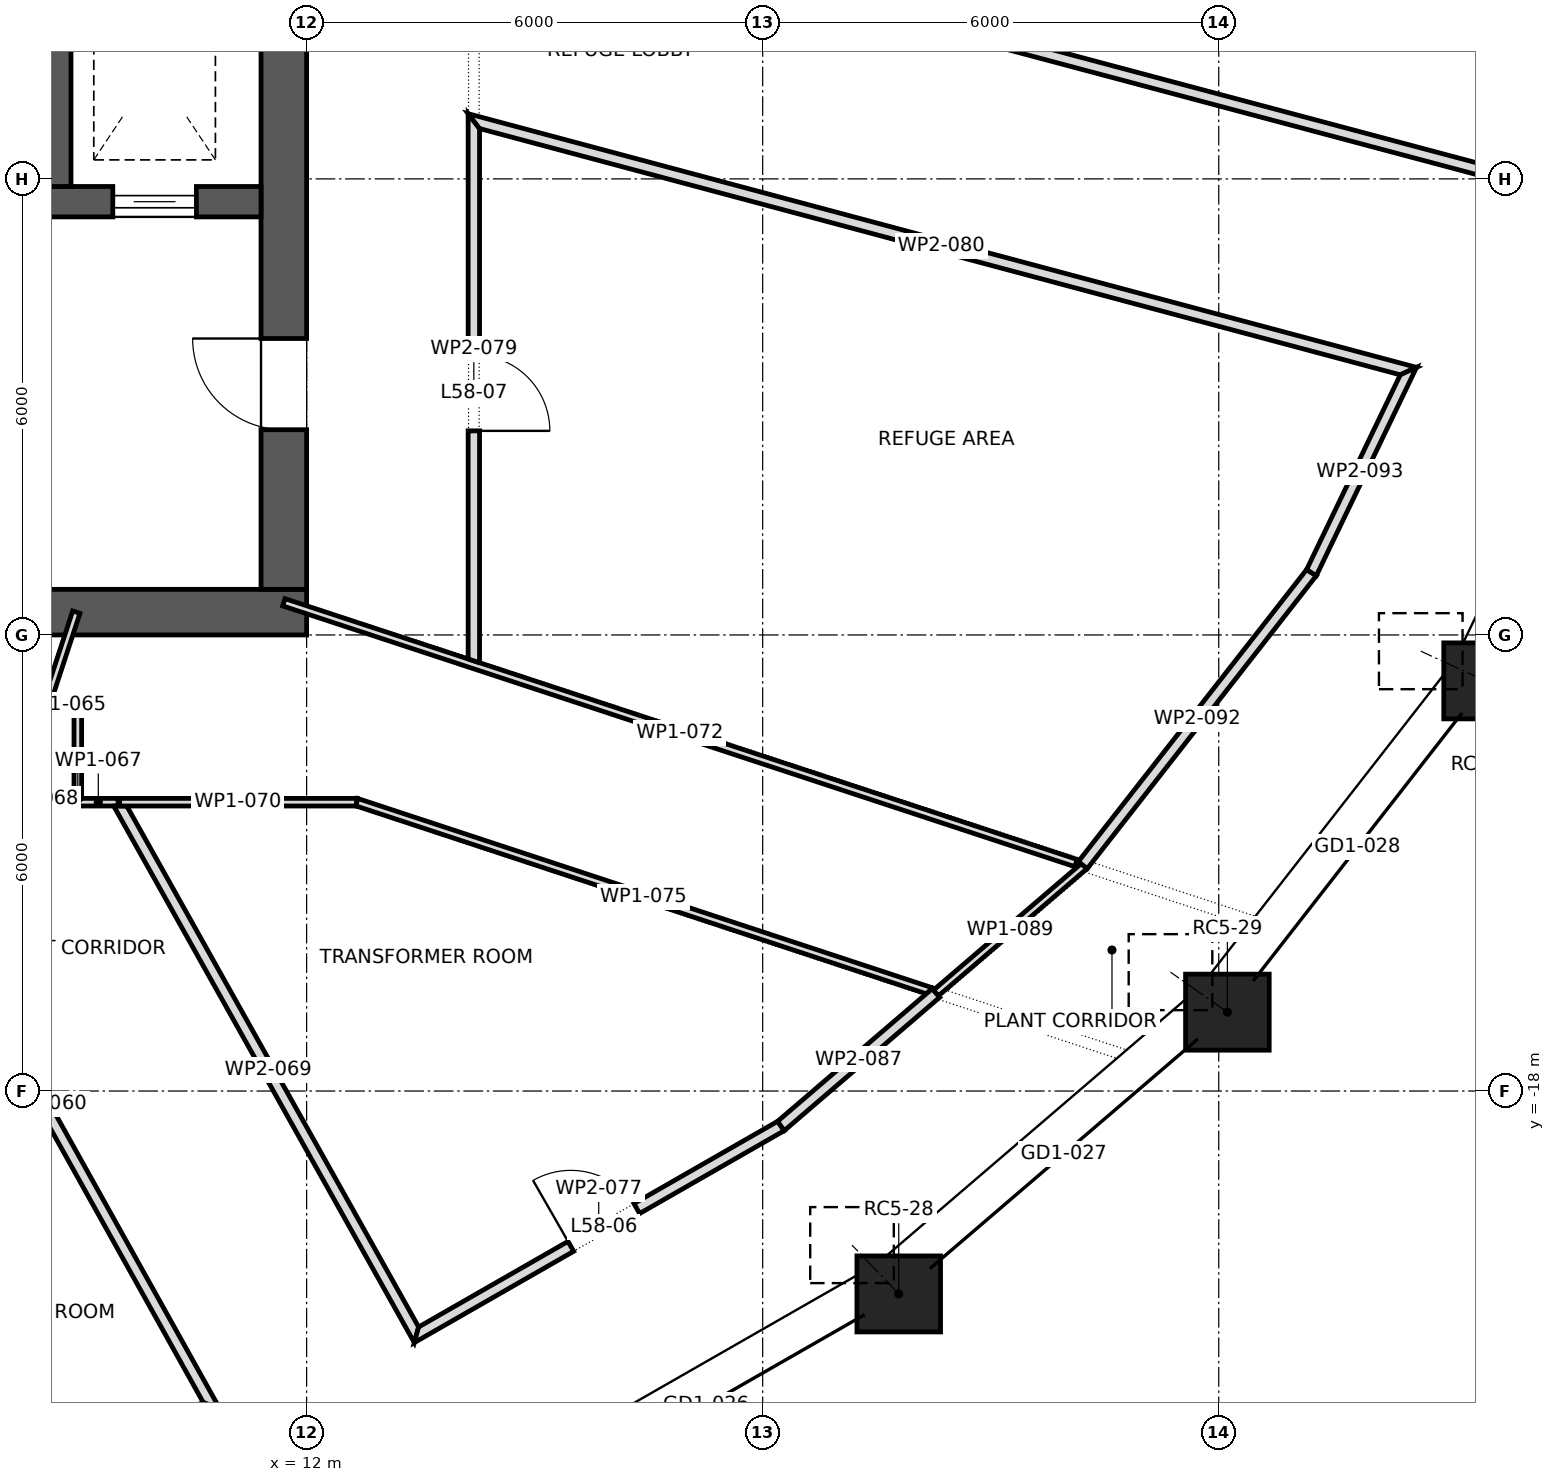
"""IFC4 building model, lengths in metres.
Left out: names, types, materials, properties, quantities, classifications, styles, units other than length and angle.
Written with IfcOpenShell. Run it as: python <this file> out.ifc"""

import sys

from ifc_helpers import new_model, si_unit, direction, frame, frame_2d, origin, origin_2d, place, context, subcontext, project, spatial, polyline, rectangle, outline, extrude, element, fill, save


model = new_model("IFC4")
c1 = context("Model", 3, precision=1e-05, world=origin(), true_north=direction((0.0, 1.0)))
c2 = subcontext(c1, "Body", "Model", "MODEL_VIEW")
j1 = project(units=[si_unit("LENGTHUNIT", "METRE"), si_unit("PLANEANGLEUNIT", "RADIAN")], contexts=[c1])
p1 = place(None, origin())
s1 = spatial("IfcSite", under=j1, at=p1, CompositionType="ELEMENT")
p2 = place(p1, origin())
s2 = spatial("IfcBuilding", under=s1, at=p2, CompositionType="ELEMENT")
p3 = place(p2, frame((0.0, 0.0, 250.9)))
s3 = spatial("IfcBuildingStorey", under=s2, at=p3, CompositionType="ELEMENT", Elevation=250.9)
p4 = place(p3, frame((19.79, -20.669, 0.083), z_axis=(-0.115812481815, 0.12096379157, 0.985877898213), x_axis=(-0.722319686129, -0.691559304059, 0.0)))
e1 = element("IfcColumn", 1, at=p4, inside=s3, PredefinedType="COLUMN", context=c2, shape_type="SweptSolid", body=[
    extrude(rectangle(XDim=1.1, YDim=1.0, at=origin_2d()), origin(), (0.0, 0.0, 1.0), 5.308),
])
p5 = place(p3, frame((24.114, -16.962, 0.086), z_axis=(-0.14102688006, 0.099169586892, 0.985026300226), x_axis=(-0.575215805529, -0.818001697473, 0.0)))
e2 = element("IfcColumn", 2, at=p5, inside=s3, PredefinedType="COLUMN", context=c2, shape_type="SweptSolid", body=[
    extrude(rectangle(XDim=1.1, YDim=1.0, at=origin_2d()), origin(), (0.0, 0.0, 1.0), 5.308),
])
p6 = place(p3, frame((27.511, -12.604, 0.088), z_axis=(-0.160721780276, 0.073644982891, 0.984248406572), x_axis=(-0.416565116305, -0.909105881555, 0.0)))
e3 = element("IfcColumn", 3, at=p6, inside=s3, PredefinedType="COLUMN", context=c2, shape_type="SweptSolid", body=[
    extrude(rectangle(XDim=1.1, YDim=1.0, at=origin_2d()), origin(), (0.0, 0.0, 1.0), 5.307),
])
p7 = place(p3, frame((-12.0, -11.7, 0.0), z_axis=(0.0, 0.0, 1.0), x_axis=(1.0, 0.0, 0.0)))
e4 = element("IfcWall", 4, at=p7, inside=s3, PredefinedType="SHEAR", context=c2, shape_type="SweptSolid", body=[
    extrude(rectangle(XDim=24.0, YDim=0.6, at=frame_2d((12.0, 0.0))), origin(), (0.0, 0.0, 1.0), 5.4),
])
p8 = place(p7, frame((10.025, 0.0, 0.0)))
e5 = element("IfcOpeningElement", 5, at=p8, cuts=e4, PredefinedType="OPENING", context=c2, shape_type="SweptSolid", body=[
    extrude(rectangle(XDim=0.8, YDim=2.1, at=frame_2d((0.4, 1.05))), frame((0.0, 0.312, 0.0), z_axis=(0.0, -1.0, 0.0), x_axis=(1.0, 0.0, 0.0)), (0.0, 0.0, 1.0), 0.624),
])
p9 = place(p7, frame((4.2, 0.0, 0.0)))
e6 = element("IfcOpeningElement", 6, at=p9, cuts=e4, PredefinedType="OPENING", context=c2, shape_type="SweptSolid", body=[
    extrude(rectangle(XDim=0.8, YDim=2.1, at=frame_2d((0.4, 1.05))), frame((0.0, 0.312, 0.0), z_axis=(0.0, -1.0, 0.0), x_axis=(1.0, 0.0, 0.0)), (0.0, 0.0, 1.0), 0.624),
])
p10 = place(p7, frame((15.85, 0.0, 0.0)))
e7 = element("IfcOpeningElement", 7, at=p10, cuts=e4, PredefinedType="OPENING", context=c2, shape_type="SweptSolid", body=[
    extrude(rectangle(XDim=0.8, YDim=2.1, at=frame_2d((0.4, 1.05))), frame((0.0, 0.312, 0.0), z_axis=(0.0, -1.0, 0.0), x_axis=(1.0, 0.0, 0.0)), (0.0, 0.0, 1.0), 0.624),
])
p11 = place(p3, frame((11.7, -11.4, 0.0), z_axis=(0.0, 0.0, 1.0), x_axis=(0.0, 1.0, 0.0)))
e8 = element("IfcWall", 8, at=p11, inside=s3, PredefinedType="SHEAR", context=c2, shape_type="SweptSolid", body=[
    extrude(rectangle(XDim=22.8, YDim=0.6, at=frame_2d((11.4, 0.0))), origin(), (0.0, 0.0, 1.0), 5.4),
])
p12 = place(p11, frame((10.2, 0.0, 0.0)))
e9 = element("IfcOpeningElement", 9, at=p12, cuts=e8, PredefinedType="OPENING", context=c2, shape_type="SweptSolid", body=[
    extrude(rectangle(XDim=2.4, YDim=2.1, at=frame_2d((1.2, 1.05))), frame((0.0, 0.312, 0.0), z_axis=(0.0, -1.0, 0.0), x_axis=(1.0, 0.0, 0.0)), (0.0, 0.0, 1.0), 0.624),
])
p13 = place(p11, frame((19.5, 0.0, 0.0)))
e10 = element("IfcOpeningElement", 10, at=p13, cuts=e8, PredefinedType="OPENING", context=c2, shape_type="SweptSolid", body=[
    extrude(rectangle(XDim=1.2, YDim=2.1, at=frame_2d((0.6, 1.05))), frame((0.0, 0.312, 0.0), z_axis=(0.0, -1.0, 0.0), x_axis=(1.0, 0.0, 0.0)), (0.0, 0.0, 1.0), 0.624),
])
p14 = place(p11, frame((2.1, 0.0, 0.0)))
e11 = element("IfcOpeningElement", 11, at=p14, cuts=e8, PredefinedType="OPENING", context=c2, shape_type="SweptSolid", body=[
    extrude(rectangle(XDim=1.2, YDim=2.1, at=frame_2d((0.6, 1.05))), frame((0.0, 0.312, 0.0), z_axis=(0.0, -1.0, 0.0), x_axis=(1.0, 0.0, 0.0)), (0.0, 0.0, 1.0), 0.624),
])
p15 = place(p3, frame((-11.4, -6.3, 0.0), z_axis=(0.0, 0.0, 1.0), x_axis=(1.0, 0.0, 0.0)))
e12 = element("IfcWall", 12, at=p15, inside=s3, PredefinedType="SHEAR", context=c2, shape_type="SweptSolid", body=[
    extrude(rectangle(XDim=22.8, YDim=0.4, at=frame_2d((11.4, 0.0))), origin(), (0.0, 0.0, 1.0), 5.4),
])
p16 = place(p15, frame((20.85, 0.0, 0.0)))
e13 = element("IfcOpeningElement", 13, at=p16, cuts=e12, PredefinedType="OPENING", context=c2, shape_type="SweptSolid", body=[
    extrude(rectangle(XDim=1.1, YDim=2.1, at=frame_2d((0.55, 1.05))), frame((0.0, 0.212, 0.0), z_axis=(0.0, -1.0, 0.0), x_axis=(1.0, 0.0, 0.0)), (0.0, 0.0, 1.0), 0.424),
])
p17 = place(p3, frame((8.75, -6.1, 0.0), z_axis=(0.0, 0.0, 1.0), x_axis=(0.0, 1.0, 0.0)))
e14 = element("IfcWall", 14, at=p17, inside=s3, PredefinedType="SHEAR", context=c2, shape_type="SweptSolid", body=[
    extrude(rectangle(XDim=2.9, YDim=0.3, at=frame_2d((1.45, 0.0))), origin(), (0.0, 0.0, 1.0), 5.4),
])
p18 = place(p3, frame((6.299, -14.162, 0.0), z_axis=(0.0, 0.0, 1.0), x_axis=(0.487226307056, -0.873275744374, 0.0)))
e15 = element("IfcWall", 15, at=p18, inside=s3, PredefinedType="PARTITIONING", context=c2, shape_type="SweptSolid", body=[
    extrude(outline(polyline([(0.088, -0.075), (1.88, -0.075), (3.672, -0.075), (5.464, -0.075), (7.255, -0.075), (9.047, -0.075), (9.225, 0.075), (9.225, 0.075), (7.38, 0.075), (5.535, 0.075), (3.69, 0.075), (1.845, 0.075), (0.0, 0.075), (0.0, 0.075), (0.088, -0.075)])), origin(), (0.0, 0.0, 1.0), 5.1),
])
p19 = place(p3, frame((8.374, -22.982, 0.0), z_axis=(0.0, 0.0, 1.0), x_axis=(0.942556062192, 0.334048004971, 0.0)))
e16 = element("IfcWall", 16, at=p19, inside=s3, PredefinedType="PARTITIONING", context=c2, shape_type="SweptSolid", body=[
    extrude(outline(polyline([(0.0, -0.075), (1.305, -0.075), (2.61, -0.075), (2.432, 0.075), (0.013, 0.075), (0.0, -0.075)])), origin(), (0.0, 0.0, 1.0), 5.1),
])
p20 = place(p3, frame((8.542, -12.844, 0.0), z_axis=(0.0, 0.0, 1.0), x_axis=(0.951016373971, -0.30914051245, 0.0)))
e17 = element("IfcWall", 17, at=p20, inside=s3, PredefinedType="PARTITIONING", context=c2, shape_type="SweptSolid", body=[
    extrude(outline(polyline([(0.0, -0.05), (0.434, -0.05), (0.507, 0.05), (0.507, 0.05), (0.1, 0.05), (0.0, -0.05)])), origin(), (0.0, 0.0, 1.0), 5.1),
])
p21 = place(p3, frame((8.97, -11.7, 0.0), z_axis=(0.0, 0.0, 1.0), x_axis=(-0.311209419885, -0.950341358131, 0.0)))
e18 = element("IfcWall", 18, at=p21, inside=s3, PredefinedType="PARTITIONING", context=c2, shape_type="SweptSolid", body=[
    extrude(outline(polyline([(1.271, -0.05), (1.271, -0.05), (1.17, 0.05), (0.0, 0.05), (0.0, -0.05), (1.271, -0.05)])), origin(), (0.0, 0.0, 1.0), 5.1),
])
p22 = place(p3, frame((8.94, -14.2, 0.0), z_axis=(0.0, 0.0, 1.0), x_axis=(1.0, 0.0, 0.0)))
e19 = element("IfcWall", 19, at=p22, inside=s3, PredefinedType="PARTITIONING", context=c2, shape_type="SweptSolid", body=[
    extrude(outline(polyline([(0.0, -0.05), (0.59, -0.05), (0.59, 0.05), (0.59, 0.05), (0.59, 0.05), (0.1, 0.05), (0.0, -0.05)])), origin(), (0.0, 0.0, 1.0), 5.1),
])
p23 = place(p3, frame((8.99, -12.954, 0.0), z_axis=(0.0, 0.0, 1.0), x_axis=(0.0, -1.0, 0.0)))
e20 = element("IfcWall", 20, at=p23, inside=s3, PredefinedType="PARTITIONING", context=c2, shape_type="SweptSolid", body=[
    extrude(outline(polyline([(1.296, -0.05), (1.296, -0.05), (1.196, 0.05), (0.0, 0.05), (0.073, -0.05), (1.296, -0.05)])), origin(), (0.0, 0.0, 1.0), 5.1),
])
p24 = place(p3, frame((9.528, -14.213, 0.0), z_axis=(0.0, 0.0, 1.0), x_axis=(0.488729226687, -0.872435523682, 0.0)))
e21 = element("IfcWall", 21, at=p24, inside=s3, PredefinedType="PARTITIONING", context=c2, shape_type="SweptSolid", body=[
    extrude(outline(polyline([(0.0, -0.075), (1.618, -0.075), (3.237, -0.075), (4.855, -0.075), (6.473, -0.075), (8.092, -0.075), (8.028, -0.012), (7.94, 0.075), (5.976, 0.075), (4.012, 0.075), (2.048, 0.075), (0.084, 0.075), (0.033, -0.016), (0.0, -0.075), (0.0, -0.075)])), origin(), (0.0, 0.0, 1.0), 5.1),
])
p25 = place(p3, frame((9.53, -14.2, 0.0), z_axis=(0.0, 0.0, 1.0), x_axis=(1.0, 0.0, 0.0)))
e22 = element("IfcWall", 22, at=p25, inside=s3, PredefinedType="PARTITIONING", context=c2, shape_type="SweptSolid", body=[
    extrude(outline(polyline([(0.0, -0.05), (1.561, -0.05), (3.122, -0.05), (3.138, 0.05), (3.138, 0.05), (1.569, 0.05), (0.0, 0.05), (0.0, -0.05)])), origin(), (0.0, 0.0, 1.0), 5.1),
])
p26 = place(p3, frame((11.7, -11.57, 0.0), z_axis=(0.0, 0.0, 1.0), x_axis=(0.949849374499, -0.312707796135, 0.0)))
e23 = element("IfcWall", 23, at=p26, inside=s3, PredefinedType="PARTITIONING", context=c2, shape_type="SweptSolid", body=[
    extrude(rectangle(XDim=10.972, YDim=0.1, at=frame_2d((5.486, 0.0))), origin(), (0.0, 0.0, 1.0), 5.1),
])
p27 = place(p3, frame((12.652, -14.198, 0.0), z_axis=(0.0, 0.0, 1.0), x_axis=(0.949797020895, -0.31286677532, 0.0)))
e24 = element("IfcWall", 24, at=p27, inside=s3, PredefinedType="PARTITIONING", context=c2, shape_type="SweptSolid", body=[
    extrude(outline(polyline([(0.016, -0.05), (1.99, -0.05), (3.965, -0.05), (5.939, -0.05), (7.913, -0.05), (7.967, 0.039), (8.002, 0.017), (8.002, 0.017), (7.988, 0.026), (8.002, 0.05), (8.002, 0.05), (6.402, 0.05), (4.802, 0.05), (3.201, 0.05), (1.601, 0.05), (0.0, 0.05), (0.008, 0.0), (0.016, -0.05), (0.016, -0.05), (0.016, -0.05)])), origin(), (0.0, 0.0, 1.0), 5.1),
])
p28 = place(p3, frame((13.379, -21.245, 0.0), z_axis=(0.0, 0.0, 1.0), x_axis=(0.867677390778, 0.497127695399, 0.0)))
e25 = element("IfcWall", 25, at=p28, inside=s3, PredefinedType="PARTITIONING", context=c2, shape_type="SweptSolid", body=[
    extrude(outline(polyline([(5.609, -0.075), (5.609, -0.074), (5.595, 0.075), (3.78, 0.075), (1.966, 0.075), (0.152, 0.075), (0.0, -0.075), (1.87, -0.075), (3.739, -0.075), (5.609, -0.075)])), origin(), (0.0, 0.0, 1.0), 5.1),
])
p29 = place(p28, frame((2.417, 0.0, 0.0)))
e26 = element("IfcOpeningElement", 26, at=p29, cuts=e25, PredefinedType="OPENING", context=c2, shape_type="SweptSolid", body=[
    extrude(rectangle(XDim=1.0, YDim=2.1, at=frame_2d((0.5, 1.05))), frame((0.0, 0.087, 0.0), z_axis=(0.0, -1.0, 0.0), x_axis=(1.0, 0.0, 0.0)), (0.0, 0.0, 1.0), 0.174),
])
p30 = place(p3, frame((14.2, -5.142, 0.0), z_axis=(0.0, 0.0, 1.0), x_axis=(0.0, -1.0, 0.0)))
e27 = element("IfcWall", 27, at=p30, inside=s3, PredefinedType="PARTITIONING", context=c2, shape_type="SweptSolid", body=[
    extrude(outline(polyline([(0.0, -0.075), (1.793, -0.075), (3.587, -0.075), (5.38, -0.075), (7.173, -0.075), (7.223, 0.075), (7.223, 0.075), (5.466, 0.075), (3.709, 0.075), (1.952, 0.075), (0.195, 0.075), (0.098, 0.0), (0.0, -0.075), (0.0, -0.075)])), origin(), (0.0, 0.0, 1.0), 5.1),
])
p31 = place(p30, frame((3.173, 0.0, 0.0)))
e28 = element("IfcOpeningElement", 28, at=p31, cuts=e27, PredefinedType="OPENING", context=c2, shape_type="SweptSolid", body=[
    extrude(rectangle(XDim=1.0, YDim=2.1, at=frame_2d((0.5, 1.05))), frame((0.0, 0.087, 0.0), z_axis=(0.0, -1.0, 0.0), x_axis=(1.0, 0.0, 0.0)), (0.0, 0.0, 1.0), 0.174),
])
p32 = place(p3, frame((14.106, -5.215, 0.0), z_axis=(0.0, 0.0, 1.0), x_axis=(0.966039521804, -0.258394354258, 0.0)))
e29 = element("IfcWall", 29, at=p32, inside=s3, PredefinedType="PARTITIONING", context=c2, shape_type="SweptSolid", body=[
    extrude(outline(polyline([(0.195, -0.075), (1.987, -0.075), (3.778, -0.075), (5.569, -0.075), (7.361, -0.075), (9.152, -0.075), (10.943, -0.075), (12.735, -0.075), (12.916, 0.075), (11.071, 0.075), (9.226, 0.075), (7.38, 0.075), (5.535, 0.075), (3.69, 0.075), (1.845, 0.075), (0.0, 0.075), (0.195, -0.075)])), origin(), (0.0, 0.0, 1.0), 5.1),
])
p33 = place(p3, frame((14.144, -2.335, 0.0), z_axis=(0.0, 0.0, 1.0), x_axis=(0.966274524703, -0.257514160603, 0.0)))
e30 = element("IfcWall", 30, at=p33, inside=s3, PredefinedType="PARTITIONING", context=c2, shape_type="SweptSolid", body=[
    extrude(outline(polyline([(0.0, -0.075), (1.988, -0.075), (3.976, -0.075), (5.965, -0.075), (7.953, -0.075), (9.941, -0.075), (11.929, -0.075), (13.917, -0.075), (13.763, 0.075), (11.813, 0.075), (9.864, 0.075), (7.914, 0.075), (5.964, 0.075), (4.015, 0.075), (2.065, 0.075), (0.115, 0.075), (0.0, -0.075)])), origin(), (0.0, 0.0, 1.0), 5.1),
])
p34 = place(p3, frame((18.235, -18.465, 0.0), z_axis=(0.0, 0.0, 1.0), x_axis=(0.758994351807, 0.651097207739, 0.0)))
e31 = element("IfcWall", 31, at=p34, inside=s3, PredefinedType="PARTITIONING", context=c2, shape_type="SweptSolid", body=[
    extrude(outline(polyline([(2.695, 0.075), (1.354, 0.075), (0.014, 0.075), (0.0, -0.075), (0.0, -0.075), (1.347, -0.075), (2.695, -0.075), (2.695, 0.075)])), origin(), (0.0, 0.0, 1.0), 5.1),
])
p35 = place(p3, frame((20.28, -16.71, 0.0), z_axis=(0.0, 0.0, 1.0), x_axis=(0.759557658446, 0.650439976859, 0.0)))
e32 = element("IfcWall", 32, at=p35, inside=s3, PredefinedType="PARTITIONING", context=c2, shape_type="SweptSolid", body=[
    extrude(outline(polyline([(2.575, -0.05), (2.575, -0.049), (2.555, 0.05), (1.292, 0.05), (0.028, 0.05), (0.0, 0.033), (0.0, -0.05), (1.288, -0.05), (2.575, -0.05)])), origin(), (0.0, 0.0, 1.0), 5.1),
])
p36 = place(p3, frame((22.211, -15.028, 0.0), z_axis=(0.0, 0.0, 1.0), x_axis=(0.61594223666, 0.787791318243, 0.0)))
e33 = element("IfcWall", 33, at=p36, inside=s3, PredefinedType="PARTITIONING", context=c2, shape_type="SweptSolid", body=[
    extrude(outline(polyline([(0.0, -0.075), (1.631, -0.075), (3.262, -0.075), (4.893, -0.075), (4.876, 0.075), (3.251, 0.075), (1.625, 0.075), (0.0, 0.075), (0.0, -0.075)])), origin(), (0.0, 0.0, 1.0), 5.1),
])
p37 = place(p3, frame((25.217, -11.187, 0.0), z_axis=(0.0, 0.0, 1.0), x_axis=(0.433511403882, 0.901148080342, 0.0)))
e34 = element("IfcWall", 34, at=p37, inside=s3, PredefinedType="PARTITIONING", context=c2, shape_type="SweptSolid", body=[
    extrude(outline(polyline([(3.041, -0.075), (3.041, -0.075), (2.86, 0.075), (1.438, 0.075), (0.016, 0.075), (0.0, -0.074), (0.0, -0.075), (1.52, -0.075), (3.041, -0.075)])), origin(), (0.0, 0.0, 1.0), 5.1),
])
p38 = place(p16, origin())
e35 = element("IfcDoor", 35, at=p38, inside=s3, OperationType="SLIDING_TO_LEFT", PredefinedType="DOOR", context=c2, shape_type="SweptSolid", body=[
    extrude(rectangle(XDim=1.1, YDim=2.1, at=frame_2d((0.55, 1.05))), frame((0.0, 0.025, 0.0), z_axis=(0.0, -1.0, 0.0), x_axis=(1.0, 0.0, 0.0)), (0.0, 0.0, 1.0), 0.05),
])
fill(e13, e35)
p39 = place(p14, origin())
e36 = element("IfcDoor", 36, at=p39, inside=s3, OperationType="SINGLE_SWING_LEFT", PredefinedType="DOOR", context=c2, shape_type="SweptSolid", body=[
    extrude(rectangle(XDim=1.2, YDim=2.1, at=frame_2d((0.6, 1.05))), frame((0.0, 0.025, 0.0), z_axis=(0.0, -1.0, 0.0), x_axis=(1.0, 0.0, 0.0)), (0.0, 0.0, 1.0), 0.05),
])
fill(e11, e36)
p40 = place(p29, origin())
e37 = element("IfcDoor", 37, at=p40, inside=s3, OperationType="SINGLE_SWING_RIGHT", PredefinedType="DOOR", context=c2, shape_type="SweptSolid", body=[
    extrude(rectangle(XDim=1.0, YDim=2.1, at=frame_2d((0.5, 1.05))), frame((0.0, 0.025, 0.0), z_axis=(0.0, -1.0, 0.0), x_axis=(1.0, 0.0, 0.0)), (0.0, 0.0, 1.0), 0.05),
])
fill(e26, e37)
p41 = place(p31, origin())
e38 = element("IfcDoor", 38, at=p41, inside=s3, OperationType="SINGLE_SWING_LEFT", PredefinedType="DOOR", context=c2, shape_type="SweptSolid", body=[
    extrude(rectangle(XDim=1.0, YDim=2.1, at=frame_2d((0.5, 1.05))), frame((0.0, 0.025, 0.0), z_axis=(0.0, -1.0, 0.0), x_axis=(1.0, 0.0, 0.0)), (0.0, 0.0, 1.0), 0.05),
])
fill(e28, e38)
save(model, sys.argv[1])
